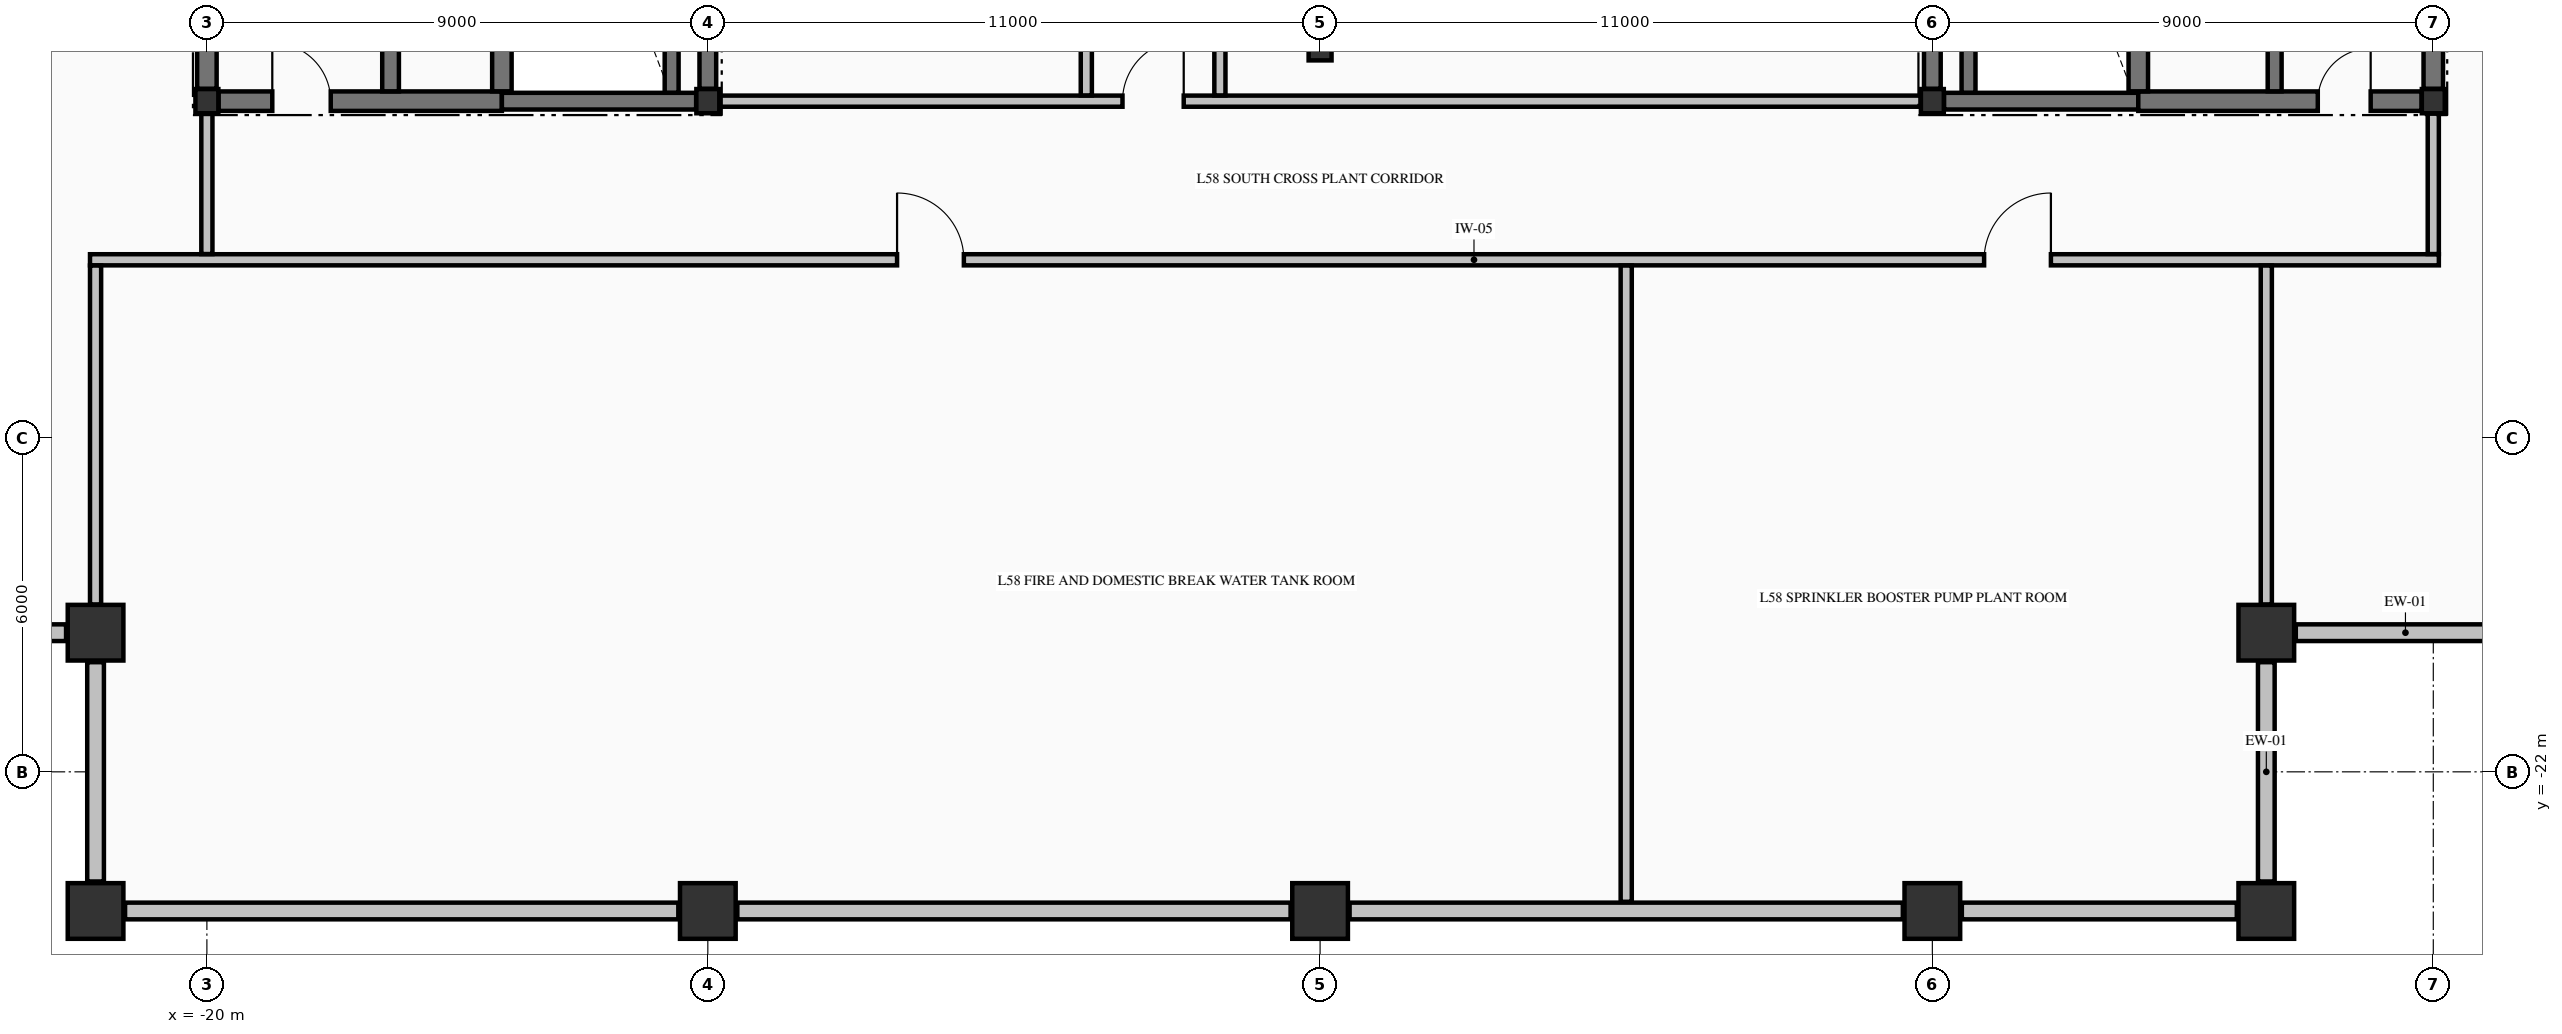
"""IFC4 building model, lengths in metres.
Left out: names, types, materials, properties, quantities, classifications, styles, units other than length and angle.
Written with IfcOpenShell. Run it as: python <this file> out.ifc"""

import sys

from ifc_helpers import new_model, si_unit, direction, frame, frame_2d, origin, origin_2d, place, context, subcontext, project, spatial, rectangle, i_section, extrude, element, fill, save


model = new_model("IFC4")
c1 = context("Model", 3, precision=1e-05, world=origin(), true_north=direction((0.0, 1.0)))
c2 = subcontext(c1, "Body", "Model", "MODEL_VIEW")
j1 = project(units=[si_unit("LENGTHUNIT", "METRE"), si_unit("PLANEANGLEUNIT", "RADIAN")], contexts=[c1])
p1 = place(None, origin())
s1 = spatial("IfcSite", under=j1, at=p1, CompositionType="ELEMENT")
p2 = place(p1, origin())
s2 = spatial("IfcBuilding", under=s1, at=p2, CompositionType="ELEMENT")
p3 = place(p2, frame((0.0, 0.0, 222.06)))
s3 = spatial("IfcBuildingStorey", under=s2, at=p3, CompositionType="ELEMENT", Elevation=222.06)
for number, where, z_axis, x_axis in (
    (1, (-22.0, -24.5, -0.425), (0.0, 0.0, 1.0), (1.0, 0.0, 0.0)),
    (2, (-11.0, -24.5, -0.425), (0.0, 0.0, 1.0), (1.0, 0.0, 0.0)),
    (3, (0.0, -24.5, -0.425), (0.0, 0.0, 1.0), (1.0, 0.0, 0.0)),
    (4, (11.0, -24.5, -0.425), (0.0, 0.0, 1.0), (1.0, 0.0, 0.0)),
    (5, (17.0, -24.5, -0.425), (0.0, 0.0, 1.0), (1.0, 0.0, 0.0)),
    (6, (-22.0, -19.5, -0.425), (0.0, 0.0, 1.0), (1.0, 0.0, 0.0)),
    (7, (17.0, -19.5, -0.425), (0.0, 0.0, 1.0), (1.0, 0.0, 0.0)),
):
    element("IfcColumn", number, at=place(p3, frame(where, z_axis=z_axis, x_axis=x_axis)), inside=s3, PredefinedType="COLUMN", context=c2, shape_type="SweptSolid", body=[
        extrude(rectangle(XDim=1.0, YDim=1.0, at=origin_2d()), origin(), (0.0, 0.0, 1.0), 4.76),
    ])
for number, where, z_axis, x_axis in (
    (8, (-20.0, -9.95, -0.425), (0.0, 0.0, 1.0), (1.0, 0.0, 0.0)),
    (9, (-11.0, -9.95, -0.425), (0.0, 0.0, 1.0), (1.0, 0.0, 0.0)),
    (10, (11.0, -9.95, -0.425), (0.0, 0.0, 1.0), (1.0, 0.0, 0.0)),
    (11, (20.0, -9.95, -0.425), (0.0, 0.0, 1.0), (1.0, 0.0, 0.0)),
    (12, (0.0, -9.0, -0.425), (0.0, 0.0, 1.0), (1.0, 0.0, 0.0)),
):
    element("IfcColumn", number, at=place(p3, frame(where, z_axis=z_axis, x_axis=x_axis)), inside=s3, PredefinedType="COLUMN", context=c2, shape_type="SweptSolid", body=[
        extrude(i_section(OverallWidth=0.412, OverallDepth=0.435, WebThickness=0.036, FlangeThickness=0.058, FilletRadius=0.015, at=origin_2d()), origin(), (0.0, 0.0, 1.0), 4.76),
    ])
p4 = place(p3, frame((17.0, -23.97, 0.0), z_axis=(0.0, 0.0, 1.0), x_axis=(0.0, 1.0, 0.0)))
e13 = element("IfcWall", 13, at=p4, inside=s3, PredefinedType="STANDARD", context=c2, shape_type="SweptSolid", body=[
    extrude(rectangle(XDim=3.94, YDim=0.3, at=frame_2d((1.97, 0.0))), origin(), (0.0, 0.0, 1.0), 2.527),
])
for number, where, z_axis, x_axis in (
    (14, (17.53, -19.5, 0.0), (0.0, 0.0, 1.0), (1.0, 0.0, 0.0)),
    (15, (-26.47, -19.5, 0.0), (0.0, 0.0, 1.0), (1.0, 0.0, 0.0)),
):
    element("IfcWall", number, at=place(p3, frame(where, z_axis=z_axis, x_axis=x_axis)), inside=s3, PredefinedType="STANDARD", context=c2, shape_type="SweptSolid", body=[
        extrude(rectangle(XDim=3.94, YDim=0.3, at=frame_2d((1.97, 0.0))), origin(), (0.0, 0.0, 1.0), 1.927),
    ])
p5 = place(p3, frame((-22.0, -20.03, 0.0), z_axis=(0.0, 0.0, 1.0), x_axis=(0.0, -1.0, 0.0)))
e16 = element("IfcWall", 16, at=p5, inside=s3, PredefinedType="STANDARD", context=c2, shape_type="SweptSolid", body=[
    extrude(rectangle(XDim=3.94, YDim=0.3, at=frame_2d((1.97, 0.0))), origin(), (0.0, 0.0, 1.0), 2.527),
])
for number, where, z_axis, x_axis in (
    (17, (-21.47, -24.5, 0.0), (0.0, 0.0, 1.0), (1.0, 0.0, 0.0)),
    (18, (-10.47, -24.5, 0.0), (0.0, 0.0, 1.0), (1.0, 0.0, 0.0)),
    (19, (0.53, -24.5, 0.0), (0.0, 0.0, 1.0), (1.0, 0.0, 0.0)),
):
    element("IfcWall", number, at=place(p3, frame(where, z_axis=z_axis, x_axis=x_axis)), inside=s3, PredefinedType="STANDARD", context=c2, shape_type="SweptSolid", body=[
        extrude(rectangle(XDim=9.94, YDim=0.3, at=frame_2d((4.97, 0.0))), origin(), (0.0, 0.0, 1.0), 1.927),
    ])
p6 = place(p3, frame((11.53, -24.5, 0.0), z_axis=(0.0, 0.0, 1.0), x_axis=(1.0, 0.0, 0.0)))
e20 = element("IfcWall", 20, at=p6, inside=s3, PredefinedType="STANDARD", context=c2, shape_type="SweptSolid", body=[
    extrude(rectangle(XDim=4.94, YDim=0.3, at=frame_2d((2.47, 0.0))), origin(), (0.0, 0.0, 1.0), 1.927),
])
p7 = place(p3, frame((-19.79, -9.95, 0.0), z_axis=(0.0, 0.0, 1.0), x_axis=(1.0, 0.0, 0.0)))
e21 = element("IfcWall", 21, at=p7, inside=s3, PredefinedType="SHEAR", context=c2, shape_type="SweptSolid", body=[
    extrude(rectangle(XDim=5.09, YDim=0.35, at=frame_2d((2.545, 0.0))), origin(), (0.0, 0.0, 1.0), 4.335),
])
p8 = place(p7, frame((0.965, 0.0, 0.0)))
e22 = element("IfcOpeningElement", 22, at=p8, cuts=e21, PredefinedType="OPENING", context=c2, shape_type="SweptSolid", body=[
    extrude(rectangle(XDim=1.05, YDim=2.15, at=frame_2d((0.525, 1.075))), frame((0.0, 0.185, 0.0), z_axis=(0.0, -1.0, 0.0), x_axis=(1.0, 0.0, 0.0)), (0.0, 0.0, 1.0), 0.37),
])
for number, where, z_axis, x_axis in (
    (23, (-14.7, -9.95, 0.0), (0.0, 0.0, 1.0), (1.0, 0.0, 0.0)),
    (24, (11.21, -9.95, 0.0), (0.0, 0.0, 1.0), (1.0, 0.0, 0.0)),
):
    element("IfcWall", number, at=place(p3, frame(where, z_axis=z_axis, x_axis=x_axis)), inside=s3, PredefinedType="SHEAR", context=c2, shape_type="SweptSolid", body=[
        extrude(rectangle(XDim=3.49, YDim=0.3, at=frame_2d((1.745, 0.0))), origin(), (0.0, 0.0, 1.0), 4.335),
    ])
p9 = place(p3, frame((14.7, -9.95, 0.0), z_axis=(0.0, 0.0, 1.0), x_axis=(1.0, 0.0, 0.0)))
e25 = element("IfcWall", 25, at=p9, inside=s3, PredefinedType="SHEAR", context=c2, shape_type="SweptSolid", body=[
    extrude(rectangle(XDim=5.09, YDim=0.35, at=frame_2d((2.545, 0.0))), origin(), (0.0, 0.0, 1.0), 4.335),
])
p10 = place(p9, frame((3.225, 0.0, 0.0)))
e26 = element("IfcOpeningElement", 26, at=p10, cuts=e25, PredefinedType="OPENING", context=c2, shape_type="SweptSolid", body=[
    extrude(rectangle(XDim=0.95, YDim=2.15, at=frame_2d((0.475, 1.075))), frame((0.0, 0.185, 0.0), z_axis=(0.0, -1.0, 0.0), x_axis=(1.0, 0.0, 0.0)), (0.0, 0.0, 1.0), 0.37),
])
p11 = place(p3, frame((-22.1, -12.8, 0.0), z_axis=(0.0, 0.0, 1.0), x_axis=(1.0, 0.0, 0.0)))
e27 = element("IfcWall", 27, at=p11, inside=s3, PredefinedType="PARTITIONING", context=c2, shape_type="SweptSolid", body=[
    extrude(rectangle(XDim=42.2, YDim=0.2, at=frame_2d((21.1, 0.0))), origin(), (0.0, 0.0, 1.0), 4.335),
])
p12 = place(p11, frame((14.5, 0.0, 0.0)))
e28 = element("IfcOpeningElement", 28, at=p12, cuts=e27, PredefinedType="OPENING", context=c2, shape_type="SweptSolid", body=[
    extrude(rectangle(XDim=1.2, YDim=2.15, at=frame_2d((0.6, 1.075))), frame((0.0, 0.11, 0.0), z_axis=(0.0, -1.0, 0.0), x_axis=(1.0, 0.0, 0.0)), (0.0, 0.0, 1.0), 0.22),
])
p13 = place(p11, frame((34.03, 0.0, 0.0)))
e29 = element("IfcOpeningElement", 29, at=p13, cuts=e27, PredefinedType="OPENING", context=c2, shape_type="SweptSolid", body=[
    extrude(rectangle(XDim=1.2, YDim=2.15, at=frame_2d((0.6, 1.075))), frame((0.0, 0.11, 0.0), z_axis=(0.0, -1.0, 0.0), x_axis=(1.0, 0.0, 0.0)), (0.0, 0.0, 1.0), 0.22),
])
p14 = place(p3, frame((-10.788, -9.95, 0.0), z_axis=(0.0, 0.0, 1.0), x_axis=(1.0, 0.0, 0.0)))
e30 = element("IfcWall", 30, at=p14, inside=s3, PredefinedType="PARTITIONING", context=c2, shape_type="SweptSolid", body=[
    extrude(rectangle(XDim=21.576, YDim=0.2, at=frame_2d((10.788, 0.0))), origin(), (0.0, 0.0, 1.0), 4.335),
])
p15 = place(p14, frame((7.238, 0.0, 0.0)))
e31 = element("IfcOpeningElement", 31, at=p15, cuts=e30, PredefinedType="OPENING", context=c2, shape_type="SweptSolid", body=[
    extrude(rectangle(XDim=1.1, YDim=2.15, at=frame_2d((0.55, 1.075))), frame((0.0, 0.11, 0.0), z_axis=(0.0, -1.0, 0.0), x_axis=(1.0, 0.0, 0.0)), (0.0, 0.0, 1.0), 0.22),
])
p16 = place(p3, frame((-20.0, -9.729, 0.0), z_axis=(0.0, 0.0, 1.0), x_axis=(0.0, 1.0, 0.0)))
e32 = element("IfcWall", 32, at=p16, inside=s3, PredefinedType="SHEAR", context=c2, shape_type="SweptSolid", body=[
    extrude(rectangle(XDim=9.507, YDim=0.35, at=frame_2d((4.753, 0.0))), origin(), (0.0, 0.0, 1.0), 4.335),
])
p17 = place(p3, frame((-16.7, -9.773, 0.0), z_axis=(0.0, 0.0, 1.0), x_axis=(0.0, 1.0, 0.0)))
e33 = element("IfcWall", 33, at=p17, inside=s3, PredefinedType="SHEAR", context=c2, shape_type="SweptSolid", body=[
    extrude(rectangle(XDim=9.371, YDim=0.3, at=frame_2d((4.686, 0.0))), origin(), (0.0, 0.0, 1.0), 4.335),
])
p18 = place(p3, frame((-14.7, -9.773, 0.0), z_axis=(0.0, 0.0, 1.0), x_axis=(0.0, 1.0, 0.0)))
e34 = element("IfcWall", 34, at=p18, inside=s3, PredefinedType="SHEAR", context=c2, shape_type="SweptSolid", body=[
    extrude(rectangle(XDim=9.371, YDim=0.35, at=frame_2d((4.686, 0.0))), origin(), (0.0, 0.0, 1.0), 4.335),
])
p19 = place(p3, frame((-11.65, -9.798, 0.0), z_axis=(0.0, 0.0, 1.0), x_axis=(0.0, 1.0, 0.0)))
e35 = element("IfcWall", 35, at=p19, inside=s3, PredefinedType="SOLIDWALL", context=c2, shape_type="SweptSolid", body=[
    extrude(rectangle(XDim=9.396, YDim=0.25, at=frame_2d((4.698, 0.0))), origin(), (0.0, 0.0, 1.0), 4.335),
])
for number, where, z_axis, x_axis in (
    (36, (-11.0, -9.729, 0.0), (0.0, 0.0, 1.0), (0.0, 1.0, 0.0)),
    (37, (11.0, -9.729, 0.0), (0.0, 0.0, 1.0), (0.0, 1.0, 0.0)),
):
    element("IfcWall", number, at=place(p3, frame(where, z_axis=z_axis, x_axis=x_axis)), inside=s3, PredefinedType="SHEAR", context=c2, shape_type="SweptSolid", body=[
        extrude(rectangle(XDim=9.507, YDim=0.3, at=frame_2d((4.753, 0.0))), origin(), (0.0, 0.0, 1.0), 4.335),
    ])
p20 = place(p3, frame((11.65, -9.798, 0.0), z_axis=(0.0, 0.0, 1.0), x_axis=(0.0, 1.0, 0.0)))
e38 = element("IfcWall", 38, at=p20, inside=s3, PredefinedType="SOLIDWALL", context=c2, shape_type="SweptSolid", body=[
    extrude(rectangle(XDim=9.396, YDim=0.25, at=frame_2d((4.698, 0.0))), origin(), (0.0, 0.0, 1.0), 4.335),
])
p21 = place(p3, frame((14.7, -9.773, 0.0), z_axis=(0.0, 0.0, 1.0), x_axis=(0.0, 1.0, 0.0)))
e39 = element("IfcWall", 39, at=p21, inside=s3, PredefinedType="SHEAR", context=c2, shape_type="SweptSolid", body=[
    extrude(rectangle(XDim=9.371, YDim=0.35, at=frame_2d((4.686, 0.0))), origin(), (0.0, 0.0, 1.0), 4.335),
])
p22 = place(p3, frame((17.15, -9.773, 0.0), z_axis=(0.0, 0.0, 1.0), x_axis=(0.0, 1.0, 0.0)))
e40 = element("IfcWall", 40, at=p22, inside=s3, PredefinedType="SOLIDWALL", context=c2, shape_type="SweptSolid", body=[
    extrude(rectangle(XDim=14.946, YDim=0.25, at=frame_2d((7.473, 0.0))), origin(), (0.0, 0.0, 1.0), 4.335),
])
p23 = place(p3, frame((20.0, -9.729, 0.0), z_axis=(0.0, 0.0, 1.0), x_axis=(0.0, 1.0, 0.0)))
e41 = element("IfcWall", 41, at=p23, inside=s3, PredefinedType="SHEAR", context=c2, shape_type="SweptSolid", body=[
    extrude(rectangle(XDim=9.507, YDim=0.35, at=frame_2d((4.753, 0.0))), origin(), (0.0, 0.0, 1.0), 4.335),
])
p24 = place(p3, frame((-22.0, -18.994, 0.0), z_axis=(0.0, 0.0, 1.0), x_axis=(0.0, 1.0, 0.0)))
e42 = element("IfcWall", 42, at=p24, inside=s3, PredefinedType="PARTITIONING", context=c2, shape_type="SweptSolid", body=[
    extrude(rectangle(XDim=6.091, YDim=0.2, at=frame_2d((3.045, 0.0))), origin(), (0.0, 0.0, 1.0), 4.335),
])
p25 = place(p3, frame((-20.0, -12.697, 0.0), z_axis=(0.0, 0.0, 1.0), x_axis=(0.0, 1.0, 0.0)))
e43 = element("IfcWall", 43, at=p25, inside=s3, PredefinedType="PARTITIONING", context=c2, shape_type="SweptSolid", body=[
    extrude(rectangle(XDim=2.523, YDim=0.2, at=frame_2d((1.262, 0.0))), origin(), (0.0, 0.0, 1.0), 1.927),
])
for number, where, z_axis, x_axis in (
    (44, (-4.2, -9.847, 0.0), (0.0, 0.0, 1.0), (0.0, 1.0, 0.0)),
    (45, (-1.8, -9.847, 0.0), (0.0, 0.0, 1.0), (0.0, 1.0, 0.0)),
):
    element("IfcWall", number, at=place(p3, frame(where, z_axis=z_axis, x_axis=x_axis)), inside=s3, PredefinedType="PARTITIONING", context=c2, shape_type="SweptSolid", body=[
        extrude(rectangle(XDim=10.344, YDim=0.2, at=frame_2d((5.172, 0.0))), origin(), (0.0, 0.0, 1.0), 4.335),
    ])
p26 = place(p3, frame((5.5, -24.335, 0.0), z_axis=(0.0, 0.0, 1.0), x_axis=(0.0, 1.0, 0.0)))
e46 = element("IfcWall", 46, at=p26, inside=s3, PredefinedType="PARTITIONING", context=c2, shape_type="SweptSolid", body=[
    extrude(rectangle(XDim=11.432, YDim=0.2, at=frame_2d((5.716, 0.0))), origin(), (0.0, 0.0, 1.0), 4.335),
])
p27 = place(p3, frame((17.0, -18.994, 0.0), z_axis=(0.0, 0.0, 1.0), x_axis=(0.0, 1.0, 0.0)))
e47 = element("IfcWall", 47, at=p27, inside=s3, PredefinedType="PARTITIONING", context=c2, shape_type="SweptSolid", body=[
    extrude(rectangle(XDim=6.091, YDim=0.2, at=frame_2d((3.045, 0.0))), origin(), (0.0, 0.0, 1.0), 4.335),
])
p28 = place(p3, frame((20.0, -12.697, 0.0), z_axis=(0.0, 0.0, 1.0), x_axis=(0.0, 1.0, 0.0)))
e48 = element("IfcWall", 48, at=p28, inside=s3, PredefinedType="PARTITIONING", context=c2, shape_type="SweptSolid", body=[
    extrude(rectangle(XDim=2.523, YDim=0.2, at=frame_2d((1.262, 0.0))), origin(), (0.0, 0.0, 1.0), 4.335),
])
p29 = place(p8, origin())
e49 = element("IfcDoor", 49, at=p29, inside=s3, OperationType="SINGLE_SWING_LEFT", PredefinedType="DOOR", context=c2, shape_type="SweptSolid", body=[
    extrude(rectangle(XDim=1.05, YDim=2.15, at=frame_2d((0.525, 1.075))), frame((0.0, 0.025, 0.0), z_axis=(0.0, -1.0, 0.0), x_axis=(1.0, 0.0, 0.0)), (0.0, 0.0, 1.0), 0.05),
])
fill(e22, e49)
p30 = place(p10, origin())
e50 = element("IfcDoor", 50, at=p30, inside=s3, OperationType="SINGLE_SWING_RIGHT", PredefinedType="DOOR", context=c2, shape_type="SweptSolid", body=[
    extrude(rectangle(XDim=0.95, YDim=2.15, at=frame_2d((0.475, 1.075))), frame((0.0, 0.025, 0.0), z_axis=(0.0, -1.0, 0.0), x_axis=(1.0, 0.0, 0.0)), (0.0, 0.0, 1.0), 0.05),
])
fill(e26, e50)
p31 = place(p15, origin())
e51 = element("IfcDoor", 51, at=p31, inside=s3, OperationType="SINGLE_SWING_RIGHT", PredefinedType="DOOR", context=c2, shape_type="SweptSolid", body=[
    extrude(rectangle(XDim=1.1, YDim=2.15, at=frame_2d((0.55, 1.075))), frame((0.0, 0.025, 0.0), z_axis=(0.0, -1.0, 0.0), x_axis=(1.0, 0.0, 0.0)), (0.0, 0.0, 1.0), 0.05),
])
fill(e31, e51)
p32 = place(p12, origin())
e52 = element("IfcDoor", 52, at=p32, inside=s3, OperationType="SINGLE_SWING_LEFT", PredefinedType="DOOR", context=c2, shape_type="SweptSolid", body=[
    extrude(rectangle(XDim=1.2, YDim=2.15, at=frame_2d((0.6, 1.075))), frame((0.0, 0.025, 0.0), z_axis=(0.0, -1.0, 0.0), x_axis=(1.0, 0.0, 0.0)), (0.0, 0.0, 1.0), 0.05),
])
fill(e28, e52)
p33 = place(p13, origin())
e53 = element("IfcDoor", 53, at=p33, inside=s3, OperationType="SINGLE_SWING_RIGHT", PredefinedType="DOOR", context=c2, shape_type="SweptSolid", body=[
    extrude(rectangle(XDim=1.2, YDim=2.15, at=frame_2d((0.6, 1.075))), frame((0.0, 0.025, 0.0), z_axis=(0.0, -1.0, 0.0), x_axis=(1.0, 0.0, 0.0)), (0.0, 0.0, 1.0), 0.05),
])
fill(e29, e53)
save(model, sys.argv[1])
